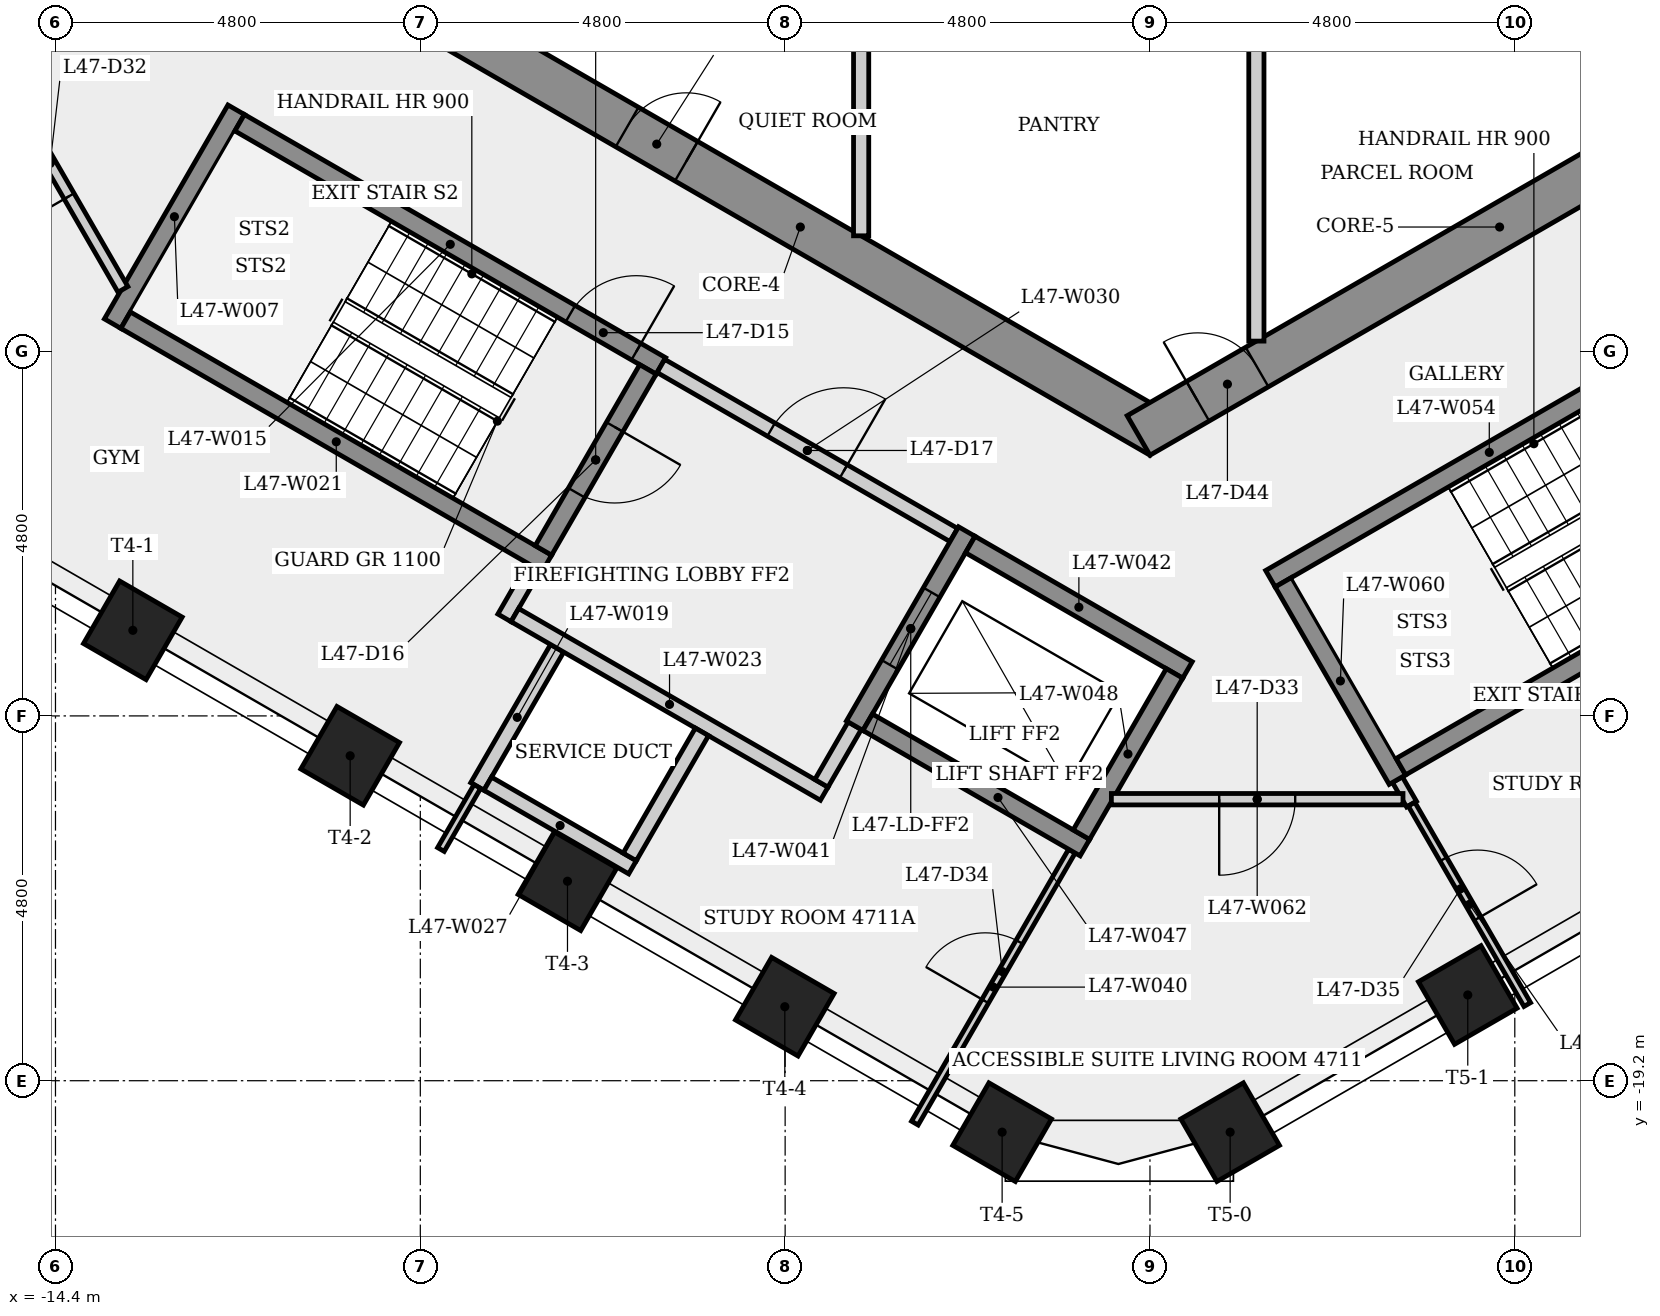
"""IFC4 building model, lengths in metres.
Left out: names, types, materials, properties, quantities, classifications, styles, units other than length and angle.
Written with IfcOpenShell. Run it as: python <this file> out.ifc"""

import sys

from ifc_helpers import new_model, si_unit, direction, frame, frame_2d, origin, origin_2d, place, context, subcontext, project, spatial, rectangle, extrude, element, fill, save


model = new_model("IFC4")
c1 = context("Model", 3, precision=1e-05, world=origin(), true_north=direction((0.0, 1.0)))
c2 = subcontext(c1, "Body", "Model", "MODEL_VIEW")
j1 = project(units=[si_unit("LENGTHUNIT", "METRE"), si_unit("PLANEANGLEUNIT", "RADIAN")], contexts=[c1])
p1 = place(None, origin())
s1 = spatial("IfcSite", under=j1, at=p1, CompositionType="ELEMENT")
p2 = place(p1, origin())
s2 = spatial("IfcBuilding", under=s1, at=p2, CompositionType="ELEMENT")
p3 = place(p2, frame((0.0, 0.0, 176.5)))
s3 = spatial("IfcBuildingStorey", under=s2, at=p3, CompositionType="ELEMENT", Elevation=176.5)
p4 = place(p3, frame((-9.35, -5.225, 0.0), z_axis=(0.0, 0.0, 1.0), x_axis=(0.866023993627, -0.500002442456, 0.0)))
e1 = element("IfcWall", 1, at=p4, inside=s3, PredefinedType="SHEAR", context=c2, shape_type="SweptSolid", body=[
    extrude(rectangle(XDim=10.97, YDim=0.6, at=frame_2d((5.485, 0.0))), origin(), (0.0, 0.0, 1.0), 3.4),
])
p5 = place(p4, frame((2.853, 0.0, 0.0)))
e2 = element("IfcOpeningElement", 2, at=p5, cuts=e1, PredefinedType="OPENING", context=c2, shape_type="SweptSolid", body=[
    extrude(rectangle(XDim=0.9, YDim=2.1, at=frame_2d((0.45, 1.05))), frame((0.0, 0.31, 0.0), z_axis=(0.0, -1.0, 0.0), x_axis=(1.0, 0.0, 0.0)), (0.0, 0.0, 1.0), 0.62),
])
p6 = place(p3, frame((-0.15, -10.71, 0.0), z_axis=(0.0, 0.0, 1.0), x_axis=(0.866023993627, 0.500002442456, 0.0)))
e3 = element("IfcWall", 3, at=p6, inside=s3, PredefinedType="SHEAR", context=c2, shape_type="SweptSolid", body=[
    extrude(rectangle(XDim=10.97, YDim=0.6, at=frame_2d((5.485, 0.0))), origin(), (0.0, 0.0, 1.0), 3.4),
])
p7 = place(p6, frame((0.9, 0.0, 0.0)))
e4 = element("IfcOpeningElement", 4, at=p7, cuts=e3, PredefinedType="OPENING", context=c2, shape_type="SweptSolid", body=[
    extrude(rectangle(XDim=0.9, YDim=2.1, at=frame_2d((0.45, 1.05))), frame((0.0, 0.31, 0.0), z_axis=(0.0, -1.0, 0.0), x_axis=(1.0, 0.0, 0.0)), (0.0, 0.0, 1.0), 0.62),
])
p8 = place(p6, frame((7.512, 0.0, 0.0)))
e5 = element("IfcOpeningElement", 5, at=p8, cuts=e3, PredefinedType="OPENING", context=c2, shape_type="SweptSolid", body=[
    extrude(rectangle(XDim=0.9, YDim=2.1, at=frame_2d((0.45, 1.05))), frame((0.0, 0.31, 0.0), z_axis=(0.0, -1.0, 0.0), x_axis=(1.0, 0.0, 0.0)), (0.0, 0.0, 1.0), 0.62),
])
for number, where, z_axis, x_axis in (
    (6, (-13.382, -13.274, 0.0), (0.0, 0.0, 1.0), (-0.5, -0.866, 0.0)),
    (7, (-10.523, -14.925, 0.0), (0.0, 0.0, 1.0), (-0.5, -0.866, 0.0)),
    (8, (-7.664, -16.575, 0.0), (0.0, 0.0, 1.0), (-0.5, -0.866, 0.0)),
    (9, (-4.804, -18.226, 0.0), (0.0, 0.0, 1.0), (-0.5, -0.866, 0.0)),
    (10, (-1.945, -19.877, 0.0), (0.0, 0.0, 1.0), (-0.5, -0.866, 0.0)),
    (11, (1.055, -19.877, 0.0), (0.0, 0.0, 1.0), (0.5, -0.866, 0.0)),
    (12, (4.181, -18.072, 0.0), (0.0, 0.0, 1.0), (0.5, -0.866, 0.0)),
):
    element("IfcColumn", number, at=place(p3, frame(where, z_axis=z_axis, x_axis=x_axis)), inside=s3, PredefinedType="COLUMN", context=c2, shape_type="SweptSolid", body=[
        extrude(rectangle(XDim=0.95, YDim=0.95, at=origin_2d()), origin(), (0.0, 0.0, 1.0), 3.4),
    ])
p9 = place(p3, frame((-13.648, -9.239, 0.0), z_axis=(0.0, 0.0, 1.0), x_axis=(0.500017246033, 0.866015446554, 0.0)))
e13 = element("IfcWall", 13, at=p9, inside=s3, PredefinedType="SHEAR", context=c2, shape_type="SweptSolid", body=[
    extrude(rectangle(XDim=3.25, YDim=0.25, at=frame_2d((1.625, 0.0))), origin(), (0.0, 0.0, 1.0), 3.05),
])
p10 = place(p3, frame((-13.512, -8.788, 0.0), z_axis=(0.0, 0.0, 1.0), x_axis=(-0.499983520007, 0.866034918304, 0.0)))
e14 = element("IfcWall", 14, at=p10, inside=s3, PredefinedType="PARTITIONING", context=c2, shape_type="SweptSolid", body=[
    extrude(rectangle(XDim=3.832, YDim=0.15, at=frame_2d((1.916, 0.0))), origin(), (0.0, 0.0, 1.0), 3.05),
])
p11 = place(p10, frame((1.416, 0.0, 0.0)))
e15 = element("IfcOpeningElement", 15, at=p11, cuts=e14, PredefinedType="OPENING", context=c2, shape_type="SweptSolid", body=[
    extrude(rectangle(XDim=1.0, YDim=2.1, at=frame_2d((0.5, 1.05))), frame((0.0, 0.085, 0.0), z_axis=(0.0, -1.0, 0.0), x_axis=(1.0, 0.0, 0.0)), (0.0, 0.0, 1.0), 0.17),
])
p12 = place(p3, frame((-11.977, -6.595, 0.0), z_axis=(0.0, 0.0, 1.0), x_axis=(0.866025499775, -0.499999833739, 0.0)))
e16 = element("IfcWall", 16, at=p12, inside=s3, PredefinedType="SHEAR", context=c2, shape_type="SweptSolid", body=[
    extrude(rectangle(XDim=6.4, YDim=0.25, at=frame_2d((3.2, 0.0))), origin(), (0.0, 0.0, 1.0), 3.05),
])
p13 = place(p12, frame((5.025, 0.0, 0.0)))
e17 = element("IfcOpeningElement", 17, at=p13, cuts=e16, PredefinedType="OPENING", context=c2, shape_type="SweptSolid", body=[
    extrude(rectangle(XDim=1.0, YDim=2.1, at=frame_2d((0.5, 1.05))), frame((0.0, 0.135, 0.0), z_axis=(0.0, -1.0, 0.0), x_axis=(1.0, 0.0, 0.0)), (0.0, 0.0, 1.0), 0.27),
])
p14 = place(p3, frame((-8.85, -15.329, 0.0), z_axis=(0.0, 0.0, 1.0), x_axis=(0.500027713859, 0.866009402589, 0.0)))
e18 = element("IfcWall", 18, at=p14, inside=s3, PredefinedType="PLUMBINGWALL", context=c2, shape_type="SweptSolid", body=[
    extrude(rectangle(XDim=2.1, YDim=0.2, at=frame_2d((1.05, 0.0))), origin(), (0.0, 0.0, 1.0), 3.05),
])
p15 = place(p3, frame((-8.493, -13.11, 0.0), z_axis=(0.0, 0.0, 1.0), x_axis=(0.500067724834, 0.865986299303, 0.0)))
e19 = element("IfcWall", 19, at=p15, inside=s3, PredefinedType="PARTITIONING", context=c2, shape_type="SweptSolid", body=[
    extrude(rectangle(XDim=0.775, YDim=0.2, at=frame_2d((0.388, 0.0))), origin(), (0.0, 0.0, 1.0), 3.05),
])
p16 = place(p3, frame((-7.935, -12.393, 0.0), z_axis=(0.0, 0.0, 1.0), x_axis=(-0.866025499775, 0.499999833739, 0.0)))
e20 = element("IfcWall", 20, at=p16, inside=s3, PredefinedType="SHEAR", context=c2, shape_type="SweptSolid", body=[
    extrude(rectangle(XDim=6.4, YDim=0.25, at=frame_2d((3.2, 0.0))), origin(), (0.0, 0.0, 1.0), 3.05),
])
p17 = place(p3, frame((-9.329, -16.158, 0.0), z_axis=(0.0, 0.0, 1.0), x_axis=(0.499950501706, 0.866053979752, 0.0)))
e21 = element("IfcWall", 21, at=p17, inside=s3, PredefinedType="PARTITIONING", context=c2, shape_type="SweptSolid", body=[
    extrude(rectangle(XDim=0.958, YDim=0.1, at=frame_2d((0.479, 0.0))), origin(), (0.0, 0.0, 1.0), 3.05),
])
p18 = place(p3, frame((-8.356, -13.073, 0.0), z_axis=(0.0, 0.0, 1.0), x_axis=(0.866038532462, -0.499977259774, 0.0)))
e22 = element("IfcWall", 22, at=p18, inside=s3, PredefinedType="PARTITIONING", context=c2, shape_type="SweptSolid", body=[
    extrude(rectangle(XDim=4.7, YDim=0.2, at=frame_2d((2.35, 0.0))), origin(), (0.0, 0.0, 1.0), 3.05),
])
p19 = place(p3, frame((-6.808, -16.392, 0.0), z_axis=(0.0, 0.0, 1.0), x_axis=(-0.866008176907, 0.50002983664, 0.0)))
e23 = element("IfcWall", 23, at=p19, inside=s3, PredefinedType="PLUMBINGWALL", context=c2, shape_type="SweptSolid", body=[
    extrude(rectangle(XDim=2.2, YDim=0.2, at=frame_2d((1.1, 0.0))), origin(), (0.0, 0.0, 1.0), 3.05),
])
p20 = place(p3, frame((-6.605, -9.841, 0.0), z_axis=(0.0, 0.0, 1.0), x_axis=(-0.499996545922, -0.866027397988, 0.0)))
e24 = element("IfcWall", 24, at=p20, inside=s3, PredefinedType="SHEAR", context=c2, shape_type="SweptSolid", body=[
    extrude(rectangle(XDim=2.75, YDim=0.25, at=frame_2d((1.375, 0.0))), origin(), (0.0, 0.0, 1.0), 3.05),
])
p21 = place(p20, frame((0.875, 0.0, 0.0)))
e25 = element("IfcOpeningElement", 25, at=p21, cuts=e24, PredefinedType="OPENING", context=c2, shape_type="SweptSolid", body=[
    extrude(rectangle(XDim=1.0, YDim=2.1, at=frame_2d((0.5, 1.05))), frame((0.0, 0.135, 0.0), z_axis=(0.0, -1.0, 0.0), x_axis=(1.0, 0.0, 0.0)), (0.0, 0.0, 1.0), 0.27),
])
p22 = place(p3, frame((-6.435, -9.795, 0.0), z_axis=(0.0, 0.0, 1.0), x_axis=(0.866012907634, -0.500021643343, 0.0)))
e26 = element("IfcWall", 26, at=p22, inside=s3, PredefinedType="PARTITIONING", context=c2, shape_type="SweptSolid", body=[
    extrude(rectangle(XDim=4.45, YDim=0.2, at=frame_2d((2.225, 0.0))), origin(), (0.0, 0.0, 1.0), 3.05),
])
p23 = place(p22, frame((1.675, 0.0, 0.0)))
e27 = element("IfcOpeningElement", 27, at=p23, cuts=e26, PredefinedType="OPENING", context=c2, shape_type="SweptSolid", body=[
    extrude(rectangle(XDim=1.1, YDim=2.1, at=frame_2d((0.55, 1.05))), frame((0.0, 0.11, 0.0), z_axis=(0.0, -1.0, 0.0), x_axis=(1.0, 0.0, 0.0)), (0.0, 0.0, 1.0), 0.22),
])
p24 = place(p3, frame((-5.895, -14.61, 0.0), z_axis=(0.0, 0.0, 1.0), x_axis=(-0.500022797313, -0.86601224135, 0.0)))
e28 = element("IfcWall", 28, at=p24, inside=s3, PredefinedType="PLUMBINGWALL", context=c2, shape_type="SweptSolid", body=[
    extrude(rectangle(XDim=1.9, YDim=0.2, at=frame_2d((0.95, 0.0))), origin(), (0.0, 0.0, 1.0), 3.05),
])
p25 = place(p3, frame((-3.885, -14.529, 0.0), z_axis=(0.0, 0.0, 1.0), x_axis=(-0.499859285417, -0.866106630146, 0.0)))
e29 = element("IfcWall", 29, at=p25, inside=s3, PredefinedType="PARTITIONING", context=c2, shape_type="SweptSolid", body=[
    extrude(rectangle(XDim=0.875, YDim=0.2, at=frame_2d((0.438, 0.0))), origin(), (0.0, 0.0, 1.0), 3.05),
])
p26 = place(p3, frame((-3.8, -5.25, 0.0), z_axis=(0.0, 0.0, 1.0), x_axis=(0.0, -1.0, 0.0)))
e30 = element("IfcWall", 30, at=p26, inside=s3, PredefinedType="PARTITIONING", context=c2, shape_type="SweptSolid", body=[
    extrude(rectangle(XDim=2.833, YDim=0.2, at=frame_2d((1.417, 0.0))), origin(), (0.0, 0.0, 1.0), 3.05),
])
p27 = place(p3, frame((-3.094, -19.758, 0.0), z_axis=(0.0, 0.0, 1.0), x_axis=(0.500027577057, 0.866009481578, 0.0)))
e31 = element("IfcWall", 31, at=p27, inside=s3, PredefinedType="PARTITIONING", context=c2, shape_type="SweptSolid", body=[
    extrude(rectangle(XDim=4.133, YDim=0.1, at=frame_2d((2.066, 0.0))), origin(), (0.0, 0.0, 1.0), 3.05),
])
p28 = place(p27, frame((1.852, 0.0, 0.0)))
e32 = element("IfcOpeningElement", 32, at=p28, cuts=e31, PredefinedType="OPENING", context=c2, shape_type="SweptSolid", body=[
    extrude(rectangle(XDim=0.9, YDim=2.1, at=frame_2d((0.45, 1.05))), frame((0.0, 0.06, 0.0), z_axis=(0.0, -1.0, 0.0), x_axis=(1.0, 0.0, 0.0)), (0.0, 0.0, 1.0), 0.12),
])
p29 = place(p3, frame((-2.41, -11.974, 0.0), z_axis=(0.0, 0.0, 1.0), x_axis=(-0.500001826776, -0.866024349092, 0.0)))
e33 = element("IfcWall", 33, at=p29, inside=s3, PredefinedType="SHEAR", context=c2, shape_type="SweptSolid", body=[
    extrude(rectangle(XDim=2.95, YDim=0.25, at=frame_2d((1.475, 0.0))), origin(), (0.0, 0.0, 1.0), 3.05),
])
p30 = place(p29, frame((0.925, 0.0, 0.0)))
e34 = element("IfcOpeningElement", 34, at=p30, cuts=e33, PredefinedType="OPENING", context=c2, shape_type="SweptSolid", body=[
    extrude(rectangle(XDim=1.1, YDim=2.1, at=frame_2d((0.55, 1.05))), frame((0.0, 0.135, 0.0), z_axis=(0.0, -1.0, 0.0), x_axis=(1.0, 0.0, 0.0)), (0.0, 0.0, 1.0), 0.27),
])
p31 = place(p3, frame((-2.364, -12.145, 0.0), z_axis=(0.0, 0.0, 1.0), x_axis=(0.866040211805, -0.499974350878, 0.0)))
e35 = element("IfcWall", 35, at=p31, inside=s3, PredefinedType="SHEAR", context=c2, shape_type="SweptSolid", body=[
    extrude(rectangle(XDim=3.3, YDim=0.25, at=frame_2d((1.65, 0.0))), origin(), (0.0, 0.0, 1.0), 3.05),
])
p32 = place(p3, frame((-0.856, -16.133, 0.0), z_axis=(0.0, 0.0, 1.0), x_axis=(-0.866021716278, 0.500006386895, 0.0)))
e36 = element("IfcWall", 36, at=p32, inside=s3, PredefinedType="SHEAR", context=c2, shape_type="SweptSolid", body=[
    extrude(rectangle(XDim=3.3, YDim=0.25, at=frame_2d((1.65, 0.0))), origin(), (0.0, 0.0, 1.0), 3.05),
])
p33 = place(p3, frame((-0.902, -15.962, 0.0), z_axis=(0.0, 0.0, 1.0), x_axis=(0.500061746146, 0.865989751695, 0.0)))
e37 = element("IfcWall", 37, at=p33, inside=s3, PredefinedType="SHEAR", context=c2, shape_type="SweptSolid", body=[
    extrude(rectangle(XDim=2.45, YDim=0.25, at=frame_2d((1.225, 0.0))), origin(), (0.0, 0.0, 1.0), 3.4),
])
p34 = place(p3, frame((1.4, -5.25, 0.0), z_axis=(0.0, 0.0, 1.0), x_axis=(0.0, -1.0, 0.0)))
e38 = element("IfcWall", 38, at=p34, inside=s3, PredefinedType="PARTITIONING", context=c2, shape_type="SweptSolid", body=[
    extrude(rectangle(XDim=4.219, YDim=0.2, at=frame_2d((2.109, 0.0))), origin(), (0.0, 0.0, 1.0), 3.05),
])
p35 = place(p3, frame((1.585, -12.595, 0.0), z_axis=(0.0, 0.0, 1.0), x_axis=(0.866036417653, 0.499980922934, 0.0)))
e39 = element("IfcWall", 39, at=p35, inside=s3, PredefinedType="SHEAR", context=c2, shape_type="SweptSolid", body=[
    extrude(rectangle(XDim=6.65, YDim=0.25, at=frame_2d((3.325, 0.0))), origin(), (0.0, 0.0, 1.0), 3.05),
])
p36 = place(p35, frame((5.275, 0.0, 0.0)))
e40 = element("IfcOpeningElement", 40, at=p36, cuts=e39, PredefinedType="OPENING", context=c2, shape_type="SweptSolid", body=[
    extrude(rectangle(XDim=1.0, YDim=2.1, at=frame_2d((0.5, 1.05))), frame((0.0, 0.135, 0.0), z_axis=(0.0, -1.0, 0.0), x_axis=(1.0, 0.0, 0.0)), (0.0, 0.0, 1.0), 0.27),
])
p37 = place(p3, frame((3.256, -15.239, 0.0), z_axis=(0.0, 0.0, 1.0), x_axis=(0.499949632511, -0.866054481515, 0.0)))
e41 = element("IfcWall", 41, at=p37, inside=s3, PredefinedType="PARTITIONING", context=c2, shape_type="SweptSolid", body=[
    extrude(rectangle(XDim=0.372, YDim=0.15, at=frame_2d((0.186, 0.0))), origin(), (0.0, 0.0, 1.0), 3.05),
])
p38 = place(p3, frame((3.256, -15.239, 0.0), z_axis=(0.0, 0.0, 1.0), x_axis=(-0.50002537861, 0.866010750942, 0.0)))
e42 = element("IfcWall", 42, at=p38, inside=s3, PredefinedType="SHEAR", context=c2, shape_type="SweptSolid", body=[
    extrude(rectangle(XDim=3.0, YDim=0.25, at=frame_2d((1.5, 0.0))), origin(), (0.0, 0.0, 1.0), 3.05),
])
p39 = place(p3, frame((3.329, -15.496, 0.0), z_axis=(0.0, 0.0, 1.0), x_axis=(-1.0, 0.0, 0.0)))
e43 = element("IfcWall", 43, at=p39, inside=s3, PredefinedType="PARTITIONING", context=c2, shape_type="SweptSolid", body=[
    extrude(rectangle(XDim=3.837, YDim=0.15, at=frame_2d((1.918, 0.0))), origin(), (0.0, 0.0, 1.0), 3.05),
])
p40 = place(p39, frame((1.418, 0.0, 0.0)))
e44 = element("IfcOpeningElement", 44, at=p40, cuts=e43, PredefinedType="OPENING", context=c2, shape_type="SweptSolid", body=[
    extrude(rectangle(XDim=1.0, YDim=2.1, at=frame_2d((0.5, 1.05))), frame((0.0, 0.085, 0.0), z_axis=(0.0, -1.0, 0.0), x_axis=(1.0, 0.0, 0.0)), (0.0, 0.0, 1.0), 0.17),
])
p41 = place(p3, frame((3.442, -15.561, 0.0), z_axis=(0.0, 0.0, 1.0), x_axis=(0.500002389912, -0.866024023964, 0.0)))
e45 = element("IfcWall", 45, at=p41, inside=s3, PredefinedType="PARTITIONING", context=c2, shape_type="SweptSolid", body=[
    extrude(rectangle(XDim=3.045, YDim=0.1, at=frame_2d((1.522, 0.0))), origin(), (0.0, 0.0, 1.0), 3.05),
])
p42 = place(p41, frame((0.837, 0.0, 0.0)))
e46 = element("IfcOpeningElement", 46, at=p42, cuts=e45, PredefinedType="OPENING", context=c2, shape_type="SweptSolid", body=[
    extrude(rectangle(XDim=0.9, YDim=2.1, at=frame_2d((0.45, 1.05))), frame((0.0, 0.06, 0.0), z_axis=(0.0, -1.0, 0.0), x_axis=(1.0, 0.0, 0.0)), (0.0, 0.0, 1.0), 0.12),
])
p43 = place(p3, frame((3.301, -15.068, 0.0), z_axis=(0.0, 0.0, 1.0), x_axis=(0.866035036182, 0.499983315828, 0.0)))
e47 = element("IfcWall", 47, at=p43, inside=s3, PredefinedType="SHEAR", context=c2, shape_type="SweptSolid", body=[
    extrude(rectangle(XDim=6.4, YDim=0.25, at=frame_2d((3.2, 0.0))), origin(), (0.0, 0.0, 1.0), 3.05),
])
p44 = place(p13, origin())
e48 = element("IfcDoor", 48, at=p44, inside=s3, OperationType="SINGLE_SWING_RIGHT", PredefinedType="DOOR", context=c2, shape_type="SweptSolid", body=[
    extrude(rectangle(XDim=1.0, YDim=2.1, at=frame_2d((0.5, 1.05))), frame((0.0, 0.025, 0.0), z_axis=(0.0, -1.0, 0.0), x_axis=(1.0, 0.0, 0.0)), (0.0, 0.0, 1.0), 0.05),
])
fill(e17, e48)
p45 = place(p21, origin())
e49 = element("IfcDoor", 49, at=p45, inside=s3, OperationType="SINGLE_SWING_LEFT", PredefinedType="DOOR", context=c2, shape_type="SweptSolid", body=[
    extrude(rectangle(XDim=1.0, YDim=2.1, at=frame_2d((0.5, 1.05))), frame((0.0, 0.025, 0.0), z_axis=(0.0, -1.0, 0.0), x_axis=(1.0, 0.0, 0.0)), (0.0, 0.0, 1.0), 0.05),
])
fill(e25, e49)
p46 = place(p23, origin())
e50 = element("IfcDoor", 50, at=p46, inside=s3, OperationType="SINGLE_SWING_RIGHT", PredefinedType="DOOR", context=c2, shape_type="SweptSolid", body=[
    extrude(rectangle(XDim=1.1, YDim=2.1, at=frame_2d((0.55, 1.05))), frame((0.0, 0.025, 0.0), z_axis=(0.0, -1.0, 0.0), x_axis=(1.0, 0.0, 0.0)), (0.0, 0.0, 1.0), 0.05),
])
fill(e27, e50)
p47 = place(p30, origin())
e51 = element("IfcDoor", 51, at=p47, inside=s3, OperationType="SLIDING_TO_LEFT", PredefinedType="DOOR", context=c2, shape_type="SweptSolid", body=[
    extrude(rectangle(XDim=1.1, YDim=2.1, at=frame_2d((0.55, 1.05))), frame((0.0, 0.025, 0.0), z_axis=(0.0, -1.0, 0.0), x_axis=(1.0, 0.0, 0.0)), (0.0, 0.0, 1.0), 0.05),
])
fill(e34, e51)
p48 = place(p11, origin())
e52 = element("IfcDoor", 52, at=p48, inside=s3, OperationType="SINGLE_SWING_LEFT", PredefinedType="DOOR", context=c2, shape_type="SweptSolid", body=[
    extrude(rectangle(XDim=1.0, YDim=2.1, at=frame_2d((0.5, 1.05))), frame((0.0, 0.025, 0.0), z_axis=(0.0, -1.0, 0.0), x_axis=(1.0, 0.0, 0.0)), (0.0, 0.0, 1.0), 0.05),
])
fill(e15, e52)
p49 = place(p40, origin())
e53 = element("IfcDoor", 53, at=p49, inside=s3, OperationType="SINGLE_SWING_RIGHT", PredefinedType="DOOR", context=c2, shape_type="SweptSolid", body=[
    extrude(rectangle(XDim=1.0, YDim=2.1, at=frame_2d((0.5, 1.05))), frame((0.0, 0.025, 0.0), z_axis=(0.0, -1.0, 0.0), x_axis=(1.0, 0.0, 0.0)), (0.0, 0.0, 1.0), 0.05),
])
fill(e44, e53)
p50 = place(p28, origin())
e54 = element("IfcDoor", 54, at=p50, inside=s3, OperationType="SINGLE_SWING_LEFT", PredefinedType="DOOR", context=c2, shape_type="SweptSolid", body=[
    extrude(rectangle(XDim=0.9, YDim=2.1, at=frame_2d((0.45, 1.05))), frame((0.0, 0.025, 0.0), z_axis=(0.0, -1.0, 0.0), x_axis=(1.0, 0.0, 0.0)), (0.0, 0.0, 1.0), 0.05),
])
fill(e32, e54)
p51 = place(p42, origin())
e55 = element("IfcDoor", 55, at=p51, inside=s3, OperationType="SINGLE_SWING_RIGHT", PredefinedType="DOOR", context=c2, shape_type="SweptSolid", body=[
    extrude(rectangle(XDim=0.9, YDim=2.1, at=frame_2d((0.45, 1.05))), frame((0.0, 0.025, 0.0), z_axis=(0.0, -1.0, 0.0), x_axis=(1.0, 0.0, 0.0)), (0.0, 0.0, 1.0), 0.05),
])
fill(e46, e55)
p52 = place(p5, origin())
e56 = element("IfcDoor", 56, at=p52, inside=s3, OperationType="SINGLE_SWING_RIGHT", PredefinedType="DOOR", context=c2, shape_type="SweptSolid", body=[
    extrude(rectangle(XDim=0.9, YDim=2.1, at=frame_2d((0.45, 1.05))), frame((0.0, 0.025, 0.0), z_axis=(0.0, -1.0, 0.0), x_axis=(1.0, 0.0, 0.0)), (0.0, 0.0, 1.0), 0.05),
])
fill(e2, e56)
p53 = place(p7, origin())
e57 = element("IfcDoor", 57, at=p53, inside=s3, OperationType="SINGLE_SWING_LEFT", PredefinedType="DOOR", context=c2, shape_type="SweptSolid", body=[
    extrude(rectangle(XDim=0.9, YDim=2.1, at=frame_2d((0.45, 1.05))), frame((0.0, 0.025, 0.0), z_axis=(0.0, -1.0, 0.0), x_axis=(1.0, 0.0, 0.0)), (0.0, 0.0, 1.0), 0.05),
])
fill(e4, e57)
save(model, sys.argv[1])
